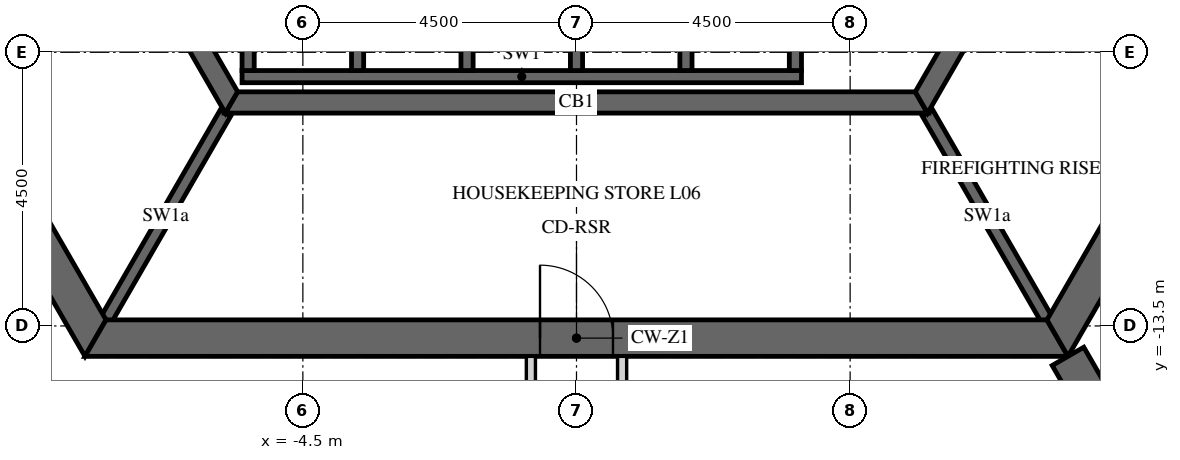
"""IFC4 building model, lengths in metres.
Left out: names, types, materials, properties, quantities, classifications, styles, units other than length and angle.
Written with IfcOpenShell. Run it as: python <this file> out.ifc"""

import sys

from ifc_helpers import new_model, si_unit, direction, frame, frame_2d, origin, place, context, subcontext, project, spatial, polyline, rectangle, outline, extrude, element, fill, save


model = new_model("IFC4")
c1 = context("Model", 3, precision=1e-05, world=origin(), true_north=direction((0.0, 1.0)))
c2 = subcontext(c1, "Body", "Model", "MODEL_VIEW")
j1 = project(units=[si_unit("LENGTHUNIT", "METRE"), si_unit("PLANEANGLEUNIT", "RADIAN")], contexts=[c1])
p1 = place(None, origin())
s1 = spatial("IfcSite", under=j1, at=p1, CompositionType="ELEMENT")
p2 = place(p1, origin())
s2 = spatial("IfcBuilding", under=s1, at=p2, CompositionType="ELEMENT")
p3 = place(p2, frame((0.0, 0.0, 37.5)))
s3 = spatial("IfcBuildingStorey", under=s2, at=p3, CompositionType="ELEMENT", Elevation=37.5)
p4 = place(p3, frame((-15.819, 0.0, -0.15), z_axis=(0.0, 0.0, 1.0), x_axis=(0.499999880136, -0.866025472988, 0.0)))
e1 = element("IfcWall", 1, at=p4, inside=s3, PredefinedType="SHEAR", context=c2, shape_type="SweptSolid", body=[
    extrude(outline(polyline([(-0.173, -0.3), (15.993, -0.3), (15.646, 0.3), (0.173, 0.3), (-0.173, -0.3)])), origin(), (0.0, 0.0, 1.0), 3.9),
])
p5 = place(p4, frame((6.981, 0.0, 0.15)))
e2 = element("IfcOpeningElement", 2, at=p5, cuts=e1, PredefinedType="OPENING", context=c2, shape_type="SweptSolid", body=[
    extrude(rectangle(XDim=1.8, YDim=2.4, at=frame_2d((0.9, 1.2))), frame((0.0, 0.31, 0.0), z_axis=(0.0, -1.0, 0.0), x_axis=(1.0, 0.0, 0.0)), (0.0, 0.0, 1.0), 0.62),
])
p6 = place(p3, frame((-7.91, -13.7, -0.15), z_axis=(0.0, 0.0, 1.0), x_axis=(1.0, 0.0, 0.0)))
e3 = element("IfcWall", 3, at=p6, inside=s3, PredefinedType="SHEAR", context=c2, shape_type="SweptSolid", body=[
    extrude(outline(polyline([(-0.173, -0.3), (15.993, -0.3), (15.646, 0.3), (0.173, 0.3), (-0.173, -0.3)])), origin(), (0.0, 0.0, 1.0), 3.9),
])
p7 = place(p6, frame((7.31, 0.0, 0.15)))
e4 = element("IfcOpeningElement", 4, at=p7, cuts=e3, PredefinedType="OPENING", context=c2, shape_type="SweptSolid", body=[
    extrude(rectangle(XDim=1.2, YDim=2.4, at=frame_2d((0.6, 1.2))), frame((0.0, 0.31, 0.0), z_axis=(0.0, -1.0, 0.0), x_axis=(1.0, 0.0, 0.0)), (0.0, 0.0, 1.0), 0.62),
])
p8 = place(p3, frame((7.91, -13.7, -0.15), z_axis=(0.0, 0.0, 1.0), x_axis=(0.499999880136, 0.866025472988, 0.0)))
e5 = element("IfcWall", 5, at=p8, inside=s3, PredefinedType="SHEAR", context=c2, shape_type="SweptSolid", body=[
    extrude(outline(polyline([(-0.173, -0.3), (15.993, -0.3), (15.646, 0.3), (0.173, 0.3), (-0.173, -0.3)])), origin(), (0.0, 0.0, 1.0), 3.9),
])
p9 = place(p8, frame((7.039, 0.0, 0.15)))
e6 = element("IfcOpeningElement", 6, at=p9, cuts=e5, PredefinedType="OPENING", context=c2, shape_type="SweptSolid", body=[
    extrude(rectangle(XDim=1.8, YDim=2.4, at=frame_2d((0.9, 1.2))), frame((0.0, 0.31, 0.0), z_axis=(0.0, -1.0, 0.0), x_axis=(1.0, 0.0, 0.0)), (0.0, 0.0, 1.0), 0.62),
])
p10 = place(p3, frame((8.083, -14.0, -0.15), z_axis=(0.0, 0.0, 1.0), x_axis=(0.499997680643, -0.866026742862, 0.0)))
e7 = element("IfcWall", 7, at=p10, inside=s3, PredefinedType="SHEAR", context=c2, shape_type="SweptSolid", body=[
    extrude(rectangle(XDim=16.509, YDim=0.6, at=frame_2d((8.254, 0.0))), origin(), (0.0, 0.0, 1.0), 3.9),
])
p11 = place(p10, frame((7.354, 0.0, 0.15)))
e8 = element("IfcOpeningElement", 8, at=p11, cuts=e7, PredefinedType="OPENING", context=c2, shape_type="SweptSolid", body=[
    extrude(rectangle(XDim=1.8, YDim=2.4, at=frame_2d((0.9, 1.2))), frame((0.0, 0.31, 0.0), z_axis=(0.0, -1.0, 0.0), x_axis=(1.0, 0.0, 0.0)), (0.0, 0.0, 1.0), 0.62),
])
p12 = place(p3, frame((-11.345, 0.0, -0.15), z_axis=(0.0, 0.0, 1.0), x_axis=(0.499995046907, -0.866028263435, 0.0)))
e9 = element("IfcWall", 9, at=p12, inside=s3, PredefinedType="SHEAR", context=c2, shape_type="SweptSolid", body=[
    extrude(outline(polyline([(-0.101, -0.175), (11.446, -0.175), (11.244, 0.175), (0.101, 0.175), (-0.101, -0.175)])), origin(), (0.0, 0.0, 1.0), 3.9),
])
p13 = place(p12, frame((4.744, 0.0, 0.15)))
e10 = element("IfcOpeningElement", 10, at=p13, cuts=e9, PredefinedType="OPENING", context=c2, shape_type="SweptSolid", body=[
    extrude(rectangle(XDim=1.8, YDim=2.4, at=frame_2d((0.9, 1.2))), frame((0.0, 0.185, 0.0), z_axis=(0.0, -1.0, 0.0), x_axis=(1.0, 0.0, 0.0)), (0.0, 0.0, 1.0), 0.37),
])
p14 = place(p3, frame((-5.673, -9.825, -0.15), z_axis=(0.0, 0.0, 1.0), x_axis=(1.0, 0.0, 0.0)))
e11 = element("IfcWall", 11, at=p14, inside=s3, PredefinedType="SHEAR", context=c2, shape_type="SweptSolid", body=[
    extrude(outline(polyline([(-0.101, -0.175), (11.446, -0.175), (11.244, 0.175), (0.101, 0.175), (-0.101, -0.175)])), origin(), (0.0, 0.0, 1.0), 3.9),
])
p15 = place(p3, frame((5.673, -9.825, -0.15), z_axis=(0.0, 0.0, 1.0), x_axis=(0.499995046907, 0.866028263435, 0.0)))
e12 = element("IfcWall", 12, at=p15, inside=s3, PredefinedType="SHEAR", context=c2, shape_type="SweptSolid", body=[
    extrude(outline(polyline([(-0.101, -0.175), (11.446, -0.175), (11.244, 0.175), (0.101, 0.175), (-0.101, -0.175)])), origin(), (0.0, 0.0, 1.0), 3.9),
])
p16 = place(p15, frame((4.801, 0.0, 0.15)))
e13 = element("IfcOpeningElement", 13, at=p16, cuts=e12, PredefinedType="OPENING", context=c2, shape_type="SweptSolid", body=[
    extrude(rectangle(XDim=1.8, YDim=2.4, at=frame_2d((0.9, 1.2))), frame((0.0, 0.185, 0.0), z_axis=(0.0, -1.0, 0.0), x_axis=(1.0, 0.0, 0.0)), (0.0, 0.0, 1.0), 0.37),
])
p17 = place(p3, frame((-5.5, -9.4, -0.25), z_axis=(0.0, 0.0, 1.0), x_axis=(1.0, 0.0, 0.0)))
e14 = element("IfcWall", 14, at=p17, inside=s3, PredefinedType="SHEAR", context=c2, shape_type="SweptSolid", body=[
    extrude(rectangle(XDim=9.2, YDim=0.2, at=frame_2d((4.6, 0.0))), origin(), (0.0, 0.0, 1.0), 3.9),
])
for number, where, z_axis, x_axis in (
    (15, (-5.4, -9.3, -0.25), (0.0, 0.0, 1.0), (0.0, 1.0, 0.0)),
    (16, (-3.6, -9.3, -0.25), (0.0, 0.0, 1.0), (0.0, 1.0, 0.0)),
    (17, (-1.8, -9.3, -0.25), (0.0, 0.0, 1.0), (0.0, 1.0, 0.0)),
    (18, (0.0, -9.3, -0.25), (0.0, 0.0, 1.0), (0.0, 1.0, 0.0)),
    (19, (1.8, -9.3, -0.25), (0.0, 0.0, 1.0), (0.0, 1.0, 0.0)),
    (20, (3.6, -9.3, -0.25), (0.0, 0.0, 1.0), (0.0, 1.0, 0.0)),
):
    element("IfcWall", number, at=place(p3, frame(where, z_axis=z_axis, x_axis=x_axis)), inside=s3, PredefinedType="SHEAR", context=c2, shape_type="SweptSolid", body=[
        extrude(rectangle(XDim=2.9, YDim=0.2, at=frame_2d((1.45, 0.0))), origin(), (0.0, 0.0, 1.0), 3.9),
    ])
for number, where, z_axis, x_axis in (
    (21, (-5.773, -10.0, -0.15), (0.0, 0.0, 1.0), (-0.5, -0.866, 0.0)),
    (22, (5.773, -10.0, -0.15), (0.0, 0.0, 1.0), (0.5, -0.866, 0.0)),
):
    element("IfcWall", number, at=place(p3, frame(where, z_axis=z_axis, x_axis=x_axis)), inside=s3, PredefinedType="SHEAR", context=c2, shape_type="SweptSolid", body=[
        extrude(rectangle(XDim=3.926, YDim=0.2, at=frame_2d((1.963, 0.0))), origin(), (0.0, 0.0, 1.0), 3.9),
    ])
p18 = place(p3, frame((-0.75, -14.0, 0.0), z_axis=(0.0, 0.0, 1.0), x_axis=(0.0, -1.0, 0.0)))
e23 = element("IfcWall", 23, at=p18, inside=s3, PredefinedType="PARTITIONING", context=c2, shape_type="SweptSolid", body=[
    extrude(rectangle(XDim=6.252, YDim=0.15, at=frame_2d((3.126, 0.0))), origin(), (0.0, 0.0, 1.0), 2.988),
])
p19 = place(p3, frame((0.75, -20.072, 0.0), z_axis=(0.0, 0.0, 1.0), x_axis=(0.0, 1.0, 0.0)))
e24 = element("IfcWall", 24, at=p19, inside=s3, PredefinedType="PARTITIONING", context=c2, shape_type="SweptSolid", body=[
    extrude(rectangle(XDim=6.072, YDim=0.15, at=frame_2d((3.036, 0.0))), origin(), (0.0, 0.0, 1.0), 2.988),
])
p20 = place(p7, origin())
e25 = element("IfcDoor", 25, at=p20, inside=s3, OperationType="SINGLE_SWING_LEFT", PredefinedType="DOOR", context=c2, shape_type="SweptSolid", body=[
    extrude(rectangle(XDim=1.2, YDim=2.4, at=frame_2d((0.6, 1.2))), frame((0.0, 0.025, 0.0), z_axis=(0.0, -1.0, 0.0), x_axis=(1.0, 0.0, 0.0)), (0.0, 0.0, 1.0), 0.05),
])
fill(e4, e25)
save(model, sys.argv[1])
